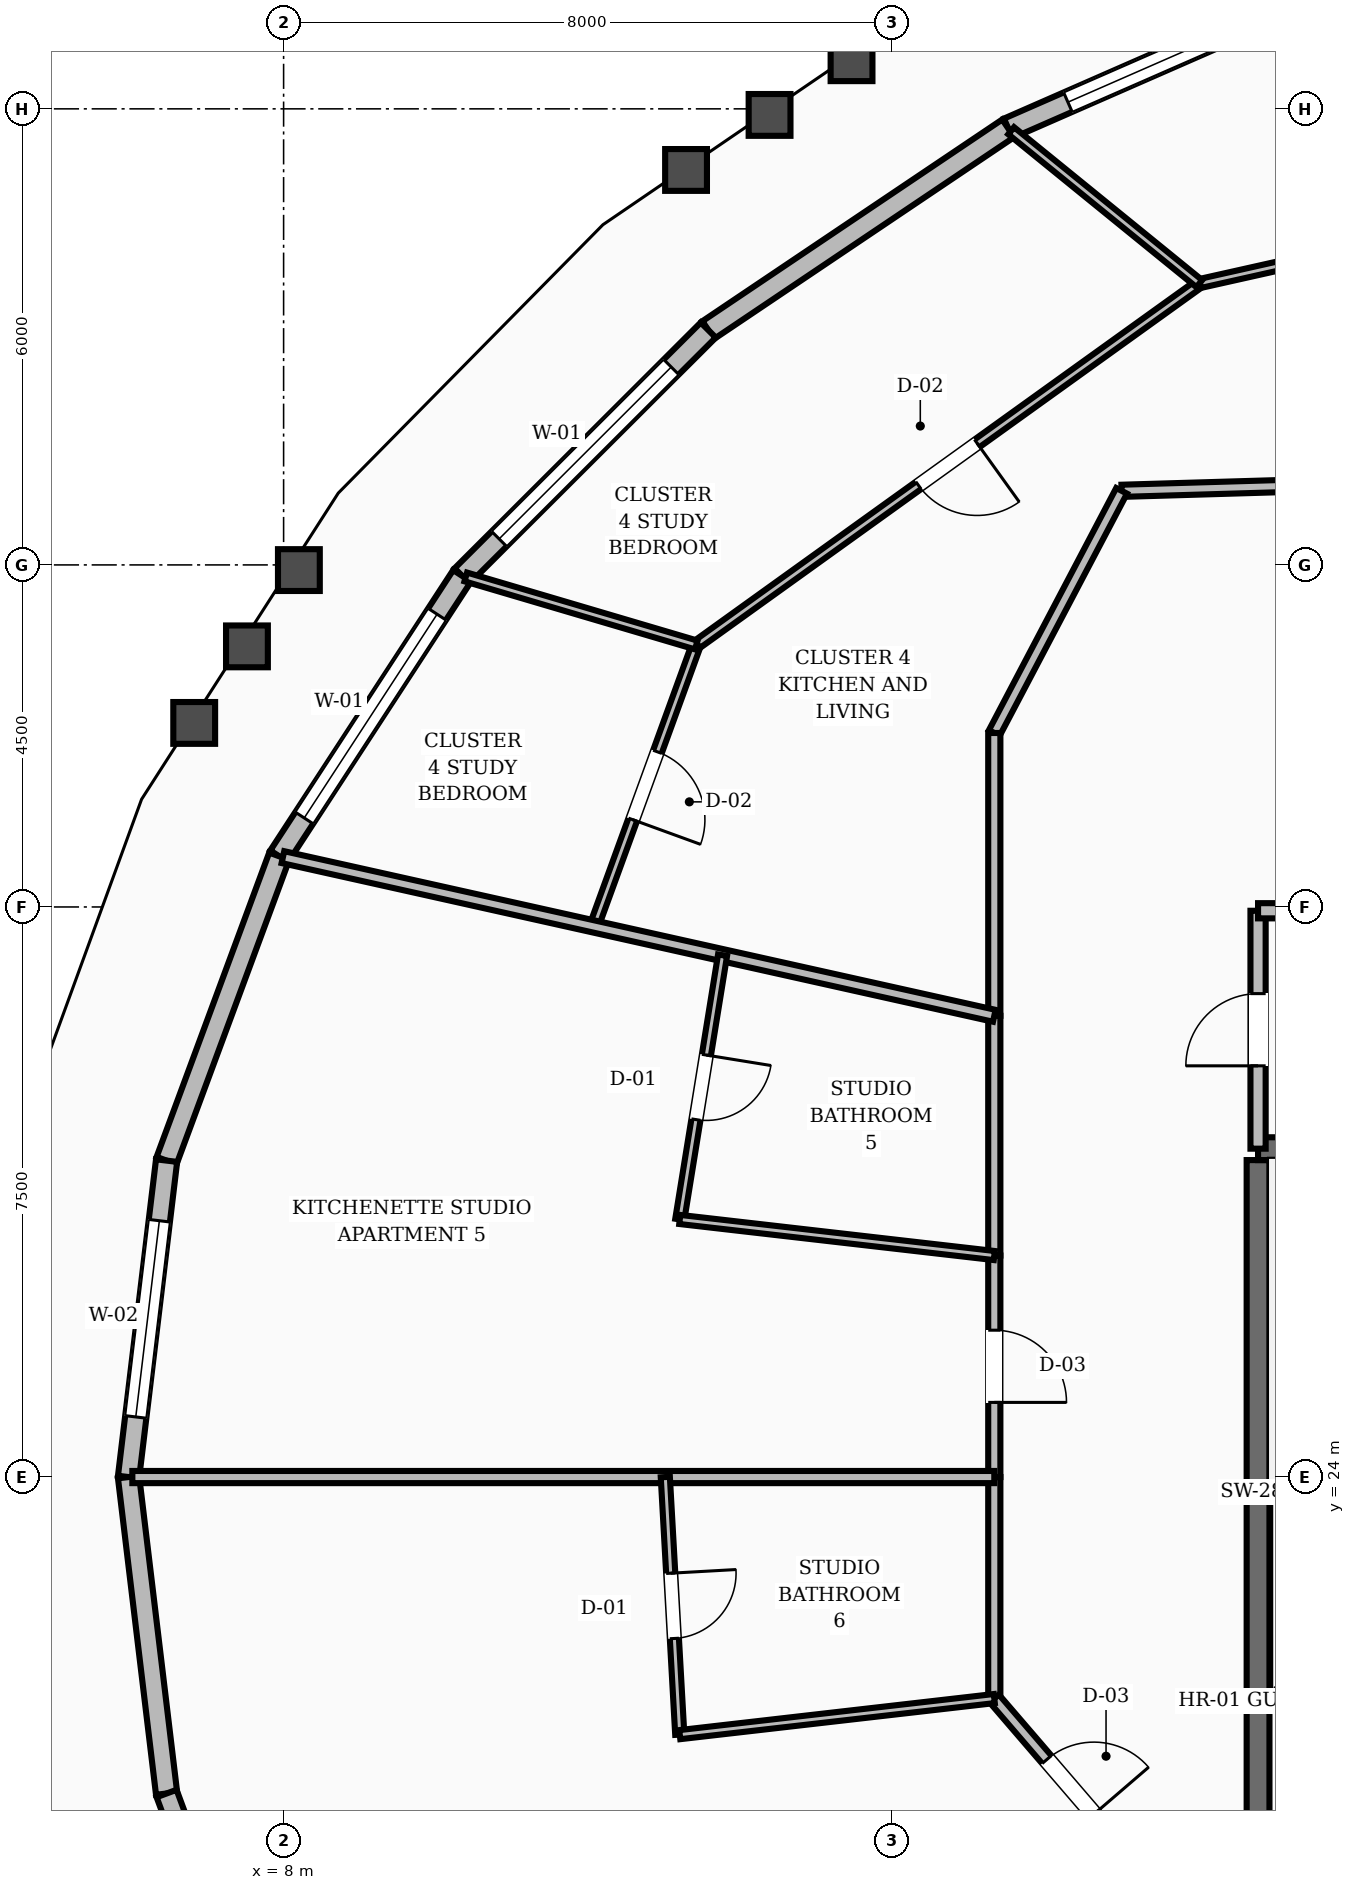
"""IFC4 building model, lengths in metres.
Left out: names, types, materials, properties, quantities, classifications, styles, units other than length and angle.
Written with IfcOpenShell. Run it as: python <this file> out.ifc"""

import sys

from ifc_helpers import new_model, si_unit, direction, frame, frame_2d, origin, place, context, subcontext, project, spatial, rectangle, extrude, element, fill, save


model = new_model("IFC4")
c1 = context("Model", 3, precision=1e-05, world=origin(), true_north=direction((0.0, 1.0)))
c2 = subcontext(c1, "Body", "Model", "MODEL_VIEW")
j1 = project(units=[si_unit("LENGTHUNIT", "METRE"), si_unit("PLANEANGLEUNIT", "RADIAN")], contexts=[c1])
p1 = place(None, origin())
s1 = spatial("IfcSite", under=j1, at=p1, CompositionType="ELEMENT")
p2 = place(p1, origin())
s2 = spatial("IfcBuilding", under=s1, at=p2, CompositionType="ELEMENT")
p3 = place(p2, frame((0.0, 0.0, 174.8)))
s3 = spatial("IfcBuildingStorey", under=s2, at=p3, CompositionType="ELEMENT", Elevation=174.8)
p4 = place(p3, frame((20.82, 19.43, 0.0), z_axis=(0.0, 0.0, 1.0), x_axis=(0.0, 1.0, 0.0)))
e1 = element("IfcWall", 1, at=p4, inside=s3, PredefinedType="SHEAR", context=c2, shape_type="SweptSolid", body=[
    extrude(rectangle(XDim=8.74, YDim=0.3, at=frame_2d((4.37, 0.0))), origin(), (0.0, 0.0, 1.0), 3.6),
])
p5 = place(p3, frame((20.82, 28.32, 0.0), z_axis=(0.0, 0.0, 1.0), x_axis=(1.0, 0.0, 0.0)))
e2 = element("IfcWall", 2, at=p5, inside=s3, PredefinedType="SHEAR", context=c2, shape_type="SweptSolid", body=[
    extrude(rectangle(XDim=3.6, YDim=0.3, at=frame_2d((1.8, 0.0))), origin(), (0.0, 0.0, 1.0), 3.6),
])
p6 = place(p3, frame((22.035, 43.716, 0.0), z_axis=(0.0, 0.0, 1.0), x_axis=(-0.915983961181, -0.401214883647, 0.0)))
e3 = element("IfcWall", 3, at=p6, inside=s3, PredefinedType="STANDARD", context=c2, shape_type="SweptSolid", body=[
    extrude(rectangle(XDim=4.915, YDim=0.28, at=frame_2d((2.458, 0.0))), origin(), (0.0, 0.0, 1.0), 2.82),
])
p7 = place(p6, frame((0.857, 0.0, 0.8)))
e4 = element("IfcOpeningElement", 4, at=p7, cuts=e3, PredefinedType="OPENING", context=c2, shape_type="SweptSolid", body=[
    extrude(rectangle(XDim=3.2, YDim=1.65, at=frame_2d((1.6, 0.825))), frame((0.0, 0.15, 0.0), z_axis=(0.0, -1.0, 0.0), x_axis=(1.0, 0.0, 0.0)), (0.0, 0.0, 1.0), 0.3),
])
p8 = place(p3, frame((17.533, 41.744, 0.0), z_axis=(0.0, 0.0, 1.0), x_axis=(-0.829776575502, -0.558095721851, 0.0)))
e5 = element("IfcWall", 5, at=p8, inside=s3, PredefinedType="STANDARD", context=c2, shape_type="SweptSolid", body=[
    extrude(rectangle(XDim=4.756, YDim=0.28, at=frame_2d((2.378, 0.0))), origin(), (0.0, 0.0, 1.0), 2.82),
])
p9 = place(p3, frame((13.587, 39.09, 0.0), z_axis=(0.0, 0.0, 1.0), x_axis=(-0.707640043992, -0.706573115919, 0.0)))
e6 = element("IfcWall", 6, at=p9, inside=s3, PredefinedType="STANDARD", context=c2, shape_type="SweptSolid", body=[
    extrude(rectangle(XDim=4.576, YDim=0.28, at=frame_2d((2.288, 0.0))), origin(), (0.0, 0.0, 1.0), 2.82),
])
p10 = place(p9, frame((0.688, 0.0, 0.8)))
e7 = element("IfcOpeningElement", 7, at=p10, cuts=e6, PredefinedType="OPENING", context=c2, shape_type="SweptSolid", body=[
    extrude(rectangle(XDim=3.2, YDim=1.65, at=frame_2d((1.6, 0.825))), frame((0.0, 0.15, 0.0), z_axis=(0.0, -1.0, 0.0), x_axis=(1.0, 0.0, 0.0)), (0.0, 0.0, 1.0), 0.3),
])
p11 = place(p3, frame((10.348, 35.856, 0.0), z_axis=(0.0, 0.0, 1.0), x_axis=(-0.54628130625, -0.837601775573, 0.0)))
e8 = element("IfcWall", 8, at=p11, inside=s3, PredefinedType="STANDARD", context=c2, shape_type="SweptSolid", body=[
    extrude(rectangle(XDim=4.405, YDim=0.28, at=frame_2d((2.202, 0.0))), origin(), (0.0, 0.0, 1.0), 2.82),
])
p12 = place(p11, frame((0.602, 0.0, 0.8)))
e9 = element("IfcOpeningElement", 9, at=p12, cuts=e8, PredefinedType="OPENING", context=c2, shape_type="SweptSolid", body=[
    extrude(rectangle(XDim=3.2, YDim=1.65, at=frame_2d((1.6, 0.825))), frame((0.0, 0.15, 0.0), z_axis=(0.0, -1.0, 0.0), x_axis=(1.0, 0.0, 0.0)), (0.0, 0.0, 1.0), 0.3),
])
p13 = place(p3, frame((7.942, 32.167, 0.0), z_axis=(0.0, 0.0, 1.0), x_axis=(-0.347096410893, -0.93782945227, 0.0)))
e10 = element("IfcWall", 10, at=p13, inside=s3, PredefinedType="STANDARD", context=c2, shape_type="SweptSolid", body=[
    extrude(rectangle(XDim=4.269, YDim=0.28, at=frame_2d((2.134, 0.0))), origin(), (0.0, 0.0, 1.0), 2.82),
])
p14 = place(p3, frame((6.46, 28.163, 0.0), z_axis=(0.0, 0.0, 1.0), x_axis=(-0.119361035634, -0.992850916892, 0.0)))
e11 = element("IfcWall", 11, at=p14, inside=s3, PredefinedType="STANDARD", context=c2, shape_type="SweptSolid", body=[
    extrude(rectangle(XDim=4.193, YDim=0.28, at=frame_2d((2.097, 0.0))), origin(), (0.0, 0.0, 1.0), 2.82),
])
p15 = place(p14, frame((0.797, 0.0, 0.8)))
e12 = element("IfcOpeningElement", 12, at=p15, cuts=e11, PredefinedType="OPENING", context=c2, shape_type="SweptSolid", body=[
    extrude(rectangle(XDim=2.6, YDim=1.65, at=frame_2d((1.3, 0.825))), frame((0.0, 0.15, 0.0), z_axis=(0.0, -1.0, 0.0), x_axis=(1.0, 0.0, 0.0)), (0.0, 0.0, 1.0), 0.3),
])
p16 = place(p3, frame((5.96, 24.0, 0.0), z_axis=(0.0, 0.0, 1.0), x_axis=(0.119361035634, -0.992850916892, 0.0)))
e13 = element("IfcWall", 13, at=p16, inside=s3, PredefinedType="STANDARD", context=c2, shape_type="SweptSolid", body=[
    extrude(rectangle(XDim=4.193, YDim=0.28, at=frame_2d((2.097, 0.0))), origin(), (0.0, 0.0, 1.0), 2.82),
])
p17 = place(p3, frame((6.46, 19.837, 0.0), z_axis=(0.0, 0.0, 1.0), x_axis=(0.347096410893, -0.93782945227, 0.0)))
e14 = element("IfcWall", 14, at=p17, inside=s3, PredefinedType="STANDARD", context=c2, shape_type="SweptSolid", body=[
    extrude(rectangle(XDim=4.269, YDim=0.28, at=frame_2d((2.134, 0.0))), origin(), (0.0, 0.0, 1.0), 2.82),
])
p18 = place(p3, frame((20.82, 28.32, 0.0), z_axis=(0.0, 0.0, 1.0), x_axis=(0.0, 1.0, 0.0)))
e15 = element("IfcWall", 15, at=p18, inside=s3, PredefinedType="SOLIDWALL", context=c2, shape_type="SweptSolid", body=[
    extrude(rectangle(XDim=3.13, YDim=0.2, at=frame_2d((1.565, 0.0))), origin(), (0.0, 0.0, 1.0), 2.8),
])
p19 = place(p18, frame((1.09, 0.0, 0.0)))
e16 = element("IfcOpeningElement", 16, at=p19, cuts=e15, PredefinedType="OPENING", context=c2, shape_type="SweptSolid", body=[
    extrude(rectangle(XDim=0.95, YDim=2.1, at=frame_2d((0.475, 1.05))), frame((0.0, 0.11, 0.0), z_axis=(0.0, -1.0, 0.0), x_axis=(1.0, 0.0, 0.0)), (0.0, 0.0, 1.0), 0.22),
])
p20 = place(p3, frame((20.82, 31.45, 0.0), z_axis=(0.0, 0.0, 1.0), x_axis=(1.0, 0.0, 0.0)))
e17 = element("IfcWall", 17, at=p20, inside=s3, PredefinedType="SOLIDWALL", context=c2, shape_type="SweptSolid", body=[
    extrude(rectangle(XDim=3.98, YDim=0.2, at=frame_2d((1.99, 0.0))), origin(), (0.0, 0.0, 1.0), 2.8),
])
p21 = place(p3, frame((23.247, 37.1, 0.0), z_axis=(0.0, 0.0, 1.0), x_axis=(-0.999561990195, -0.029594387265, 0.0)))
e18 = element("IfcWall", 18, at=p21, inside=s3, PredefinedType="SOLIDWALL", context=c2, shape_type="SweptSolid", body=[
    extrude(rectangle(XDim=4.224, YDim=0.16, at=frame_2d((2.112, 0.0))), origin(), (0.0, 0.0, 1.0), 2.8),
])
p22 = place(p3, frame((19.025, 36.975, 0.0), z_axis=(0.0, 0.0, 1.0), x_axis=(-0.46527115782, -0.885168204185, 0.0)))
e19 = element("IfcWall", 19, at=p22, inside=s3, PredefinedType="SOLIDWALL", context=c2, shape_type="SweptSolid", body=[
    extrude(rectangle(XDim=3.6, YDim=0.16, at=frame_2d((1.8, 0.0))), origin(), (0.0, 0.0, 1.0), 2.8),
])
p23 = place(p3, frame((17.35, 33.789, 0.0), z_axis=(0.0, 0.0, 1.0), x_axis=(0.0, -1.0, 0.0)))
e20 = element("IfcWall", 20, at=p23, inside=s3, PredefinedType="SOLIDWALL", context=c2, shape_type="SweptSolid", body=[
    extrude(rectangle(XDim=3.721, YDim=0.16, at=frame_2d((1.86, 0.0))), origin(), (0.0, 0.0, 1.0), 2.8),
])
p24 = place(p3, frame((17.35, 30.068, 0.0), z_axis=(0.0, 0.0, 1.0), x_axis=(0.0, -1.0, 0.0)))
e21 = element("IfcWall", 21, at=p24, inside=s3, PredefinedType="SOLIDWALL", context=c2, shape_type="SweptSolid", body=[
    extrude(rectangle(XDim=3.154, YDim=0.16, at=frame_2d((1.577, 0.0))), origin(), (0.0, 0.0, 1.0), 2.8),
])
p25 = place(p3, frame((17.35, 26.914, 0.0), z_axis=(0.0, 0.0, 1.0), x_axis=(0.0, -1.0, 0.0)))
e22 = element("IfcWall", 22, at=p25, inside=s3, PredefinedType="SOLIDWALL", context=c2, shape_type="SweptSolid", body=[
    extrude(rectangle(XDim=2.914, YDim=0.16, at=frame_2d((1.457, 0.0))), origin(), (0.0, 0.0, 1.0), 2.8),
])
p26 = place(p25, frame((0.982, 0.0, 0.0)))
e23 = element("IfcOpeningElement", 23, at=p26, cuts=e22, PredefinedType="OPENING", context=c2, shape_type="SweptSolid", body=[
    extrude(rectangle(XDim=0.95, YDim=2.1, at=frame_2d((0.475, 1.05))), frame((0.0, 0.09, 0.0), z_axis=(0.0, -1.0, 0.0), x_axis=(1.0, 0.0, 0.0)), (0.0, 0.0, 1.0), 0.18),
])
p27 = place(p3, frame((17.35, 24.0, 0.0), z_axis=(0.0, 0.0, 1.0), x_axis=(0.0, -1.0, 0.0)))
e24 = element("IfcWall", 24, at=p27, inside=s3, PredefinedType="SOLIDWALL", context=c2, shape_type="SweptSolid", body=[
    extrude(rectangle(XDim=2.914, YDim=0.16, at=frame_2d((1.457, 0.0))), origin(), (0.0, 0.0, 1.0), 2.8),
])
p28 = place(p3, frame((17.35, 21.086, 0.0), z_axis=(0.0, 0.0, 1.0), x_axis=(0.652022797448, -0.758199361388, 0.0)))
e25 = element("IfcWall", 25, at=p28, inside=s3, PredefinedType="SOLIDWALL", context=c2, shape_type="SweptSolid", body=[
    extrude(rectangle(XDim=3.067, YDim=0.16, at=frame_2d((1.534, 0.0))), origin(), (0.0, 0.0, 1.0), 2.8),
])
p29 = place(p28, frame((1.059, 0.0, 0.0)))
e26 = element("IfcOpeningElement", 26, at=p29, cuts=e25, PredefinedType="OPENING", context=c2, shape_type="SweptSolid", body=[
    extrude(rectangle(XDim=0.95, YDim=2.1, at=frame_2d((0.475, 1.05))), frame((0.0, 0.09, 0.0), z_axis=(0.0, -1.0, 0.0), x_axis=(1.0, 0.0, 0.0)), (0.0, 0.0, 1.0), 0.18),
])
p30 = place(p3, frame((28.009, 41.485, 0.0), z_axis=(0.0, 0.0, 1.0), x_axis=(-0.975790457845, -0.218707527028, 0.0)))
e27 = element("IfcWall", 27, at=p30, inside=s3, PredefinedType="PARTITIONING", context=c2, shape_type="SweptSolid", body=[
    extrude(rectangle(XDim=8.159, YDim=0.12, at=frame_2d((4.08, 0.0))), origin(), (0.0, 0.0, 1.0), 2.8),
])
p31 = place(p30, frame((4.997, 0.0, 0.0)))
e28 = element("IfcOpeningElement", 28, at=p31, cuts=e27, PredefinedType="OPENING", context=c2, shape_type="SweptSolid", body=[
    extrude(rectangle(XDim=0.95, YDim=2.1, at=frame_2d((0.475, 1.05))), frame((0.0, 0.07, 0.0), z_axis=(0.0, -1.0, 0.0), x_axis=(1.0, 0.0, 0.0)), (0.0, 0.0, 1.0), 0.14),
])
p32 = place(p3, frame((20.047, 39.7, 0.0), z_axis=(0.0, 0.0, 1.0), x_axis=(-0.812159557972, -0.583435388364, 0.0)))
e29 = element("IfcWall", 29, at=p32, inside=s3, PredefinedType="PARTITIONING", context=c2, shape_type="SweptSolid", body=[
    extrude(rectangle(XDim=8.148, YDim=0.12, at=frame_2d((4.074, 0.0))), origin(), (0.0, 0.0, 1.0), 2.8),
])
p33 = place(p32, frame((3.599, 0.0, 0.0)))
e30 = element("IfcOpeningElement", 30, at=p33, cuts=e29, PredefinedType="OPENING", context=c2, shape_type="SweptSolid", body=[
    extrude(rectangle(XDim=0.95, YDim=2.1, at=frame_2d((0.475, 1.05))), frame((0.0, 0.07, 0.0), z_axis=(0.0, -1.0, 0.0), x_axis=(1.0, 0.0, 0.0)), (0.0, 0.0, 1.0), 0.14),
])
p34 = place(p3, frame((20.047, 39.7, 0.0), z_axis=(0.0, 0.0, 1.0), x_axis=(-0.776036734146, 0.630687709771, 0.0)))
e31 = element("IfcWall", 31, at=p34, inside=s3, PredefinedType="PARTITIONING", context=c2, shape_type="SweptSolid", body=[
    extrude(rectangle(XDim=3.19, YDim=0.12, at=frame_2d((1.595, 0.0))), origin(), (0.0, 0.0, 1.0), 2.8),
])
p35 = place(p3, frame((13.429, 34.946, 0.0), z_axis=(0.0, 0.0, 1.0), x_axis=(-0.341981820704, -0.939706568195, 0.0)))
e32 = element("IfcWall", 32, at=p35, inside=s3, PredefinedType="PARTITIONING", context=c2, shape_type="SweptSolid", body=[
    extrude(rectangle(XDim=3.941, YDim=0.12, at=frame_2d((1.97, 0.0))), origin(), (0.0, 0.0, 1.0), 2.8),
])
p36 = place(p35, frame((1.495, 0.0, 0.0)))
e33 = element("IfcOpeningElement", 33, at=p36, cuts=e32, PredefinedType="OPENING", context=c2, shape_type="SweptSolid", body=[
    extrude(rectangle(XDim=0.95, YDim=2.1, at=frame_2d((0.475, 1.05))), frame((0.0, 0.07, 0.0), z_axis=(0.0, -1.0, 0.0), x_axis=(1.0, 0.0, 0.0)), (0.0, 0.0, 1.0), 0.14),
])
p37 = place(p3, frame((13.429, 34.946, 0.0), z_axis=(0.0, 0.0, 1.0), x_axis=(-0.959062516334, 0.283194438087, 0.0)))
e34 = element("IfcWall", 34, at=p37, inside=s3, PredefinedType="PARTITIONING", context=c2, shape_type="SweptSolid", body=[
    extrude(rectangle(XDim=3.162, YDim=0.12, at=frame_2d((1.581, 0.0))), origin(), (0.0, 0.0, 1.0), 2.8),
])
p38 = place(p3, frame((17.35, 30.068, 0.0), z_axis=(0.0, 0.0, 1.0), x_axis=(-0.976019030179, 0.217685214765, 0.0)))
e35 = element("IfcWall", 35, at=p38, inside=s3, PredefinedType="SOLIDWALL", context=c2, shape_type="SweptSolid", body=[
    extrude(rectangle(XDim=9.589, YDim=0.16, at=frame_2d((4.794, 0.0))), origin(), (0.0, 0.0, 1.0), 2.8),
])
p39 = place(p3, frame((13.775, 30.865, 0.0), z_axis=(0.0, 0.0, 1.0), x_axis=(-0.159855739545, -0.987140386437, 0.0)))
e36 = element("IfcWall", 36, at=p39, inside=s3, PredefinedType="PARTITIONING", context=c2, shape_type="SweptSolid", body=[
    extrude(rectangle(XDim=3.522, YDim=0.12, at=frame_2d((1.761, 0.0))), origin(), (0.0, 0.0, 1.0), 2.8),
])
p40 = place(p39, frame((1.331, 0.0, 0.0)))
e37 = element("IfcOpeningElement", 37, at=p40, cuts=e36, PredefinedType="OPENING", context=c2, shape_type="SweptSolid", body=[
    extrude(rectangle(XDim=0.86, YDim=2.1, at=frame_2d((0.43, 1.05))), frame((0.0, 0.07, 0.0), z_axis=(0.0, -1.0, 0.0), x_axis=(1.0, 0.0, 0.0)), (0.0, 0.0, 1.0), 0.14),
])
p41 = place(p3, frame((17.35, 26.914, 0.0), z_axis=(0.0, 0.0, 1.0), x_axis=(-0.993480615662, 0.114001167992, 0.0)))
e38 = element("IfcWall", 38, at=p41, inside=s3, PredefinedType="PARTITIONING", context=c2, shape_type="SweptSolid", body=[
    extrude(rectangle(XDim=4.165, YDim=0.12, at=frame_2d((2.083, 0.0))), origin(), (0.0, 0.0, 1.0), 2.8),
])
p42 = place(p3, frame((17.35, 24.0, 0.0), z_axis=(0.0, 0.0, 1.0), x_axis=(-1.0, 0.0, 0.0)))
e39 = element("IfcWall", 39, at=p42, inside=s3, PredefinedType="SOLIDWALL", context=c2, shape_type="SweptSolid", body=[
    extrude(rectangle(XDim=11.34, YDim=0.16, at=frame_2d((5.67, 0.0))), origin(), (0.0, 0.0, 1.0), 2.8),
])
p43 = place(p3, frame((13.022, 24.0, 0.0), z_axis=(0.0, 0.0, 1.0), x_axis=(0.056031711183, -0.998428989634, 0.0)))
e40 = element("IfcWall", 40, at=p43, inside=s3, PredefinedType="PARTITIONING", context=c2, shape_type="SweptSolid", body=[
    extrude(rectangle(XDim=3.394, YDim=0.12, at=frame_2d((1.697, 0.0))), origin(), (0.0, 0.0, 1.0), 2.8),
])
p44 = place(p43, frame((1.267, 0.0, 0.0)))
e41 = element("IfcOpeningElement", 41, at=p44, cuts=e40, PredefinedType="OPENING", context=c2, shape_type="SweptSolid", body=[
    extrude(rectangle(XDim=0.86, YDim=2.1, at=frame_2d((0.43, 1.05))), frame((0.0, 0.07, 0.0), z_axis=(0.0, -1.0, 0.0), x_axis=(1.0, 0.0, 0.0)), (0.0, 0.0, 1.0), 0.14),
])
p45 = place(p3, frame((17.35, 21.086, 0.0), z_axis=(0.0, 0.0, 1.0), x_axis=(-0.993480615662, -0.114001167992, 0.0)))
e42 = element("IfcWall", 42, at=p45, inside=s3, PredefinedType="PARTITIONING", context=c2, shape_type="SweptSolid", body=[
    extrude(rectangle(XDim=4.165, YDim=0.12, at=frame_2d((2.083, 0.0))), origin(), (0.0, 0.0, 1.0), 2.8),
])
p46 = place(p7, origin())
e43 = element("IfcWindow", 43, at=p46, inside=s3, PartitioningType="SINGLE_PANEL", PredefinedType="WINDOW", context=c2, shape_type="SweptSolid", body=[
    extrude(rectangle(XDim=3.2, YDim=1.65, at=frame_2d((1.6, 0.825))), frame((0.0, 0.03, 0.0), z_axis=(0.0, -1.0, 0.0), x_axis=(1.0, 0.0, 0.0)), (0.0, 0.0, 1.0), 0.06),
])
fill(e4, e43)
p47 = place(p10, origin())
e44 = element("IfcWindow", 44, at=p47, inside=s3, PartitioningType="SINGLE_PANEL", PredefinedType="WINDOW", context=c2, shape_type="SweptSolid", body=[
    extrude(rectangle(XDim=3.2, YDim=1.65, at=frame_2d((1.6, 0.825))), frame((0.0, 0.03, 0.0), z_axis=(0.0, -1.0, 0.0), x_axis=(1.0, 0.0, 0.0)), (0.0, 0.0, 1.0), 0.06),
])
fill(e7, e44)
p48 = place(p12, origin())
e45 = element("IfcWindow", 45, at=p48, inside=s3, PartitioningType="SINGLE_PANEL", PredefinedType="WINDOW", context=c2, shape_type="SweptSolid", body=[
    extrude(rectangle(XDim=3.2, YDim=1.65, at=frame_2d((1.6, 0.825))), frame((0.0, 0.03, 0.0), z_axis=(0.0, -1.0, 0.0), x_axis=(1.0, 0.0, 0.0)), (0.0, 0.0, 1.0), 0.06),
])
fill(e9, e45)
p49 = place(p15, origin())
e46 = element("IfcWindow", 46, at=p49, inside=s3, PartitioningType="SINGLE_PANEL", PredefinedType="WINDOW", context=c2, shape_type="SweptSolid", body=[
    extrude(rectangle(XDim=2.6, YDim=1.65, at=frame_2d((1.3, 0.825))), frame((0.0, 0.03, 0.0), z_axis=(0.0, -1.0, 0.0), x_axis=(1.0, 0.0, 0.0)), (0.0, 0.0, 1.0), 0.06),
])
fill(e12, e46)
p50 = place(p19, origin())
e47 = element("IfcDoor", 47, at=p50, inside=s3, OperationType="SINGLE_SWING_LEFT", PredefinedType="DOOR", context=c2, shape_type="SweptSolid", body=[
    extrude(rectangle(XDim=0.95, YDim=2.1, at=frame_2d((0.475, 1.05))), frame((0.0, 0.025, 0.0), z_axis=(0.0, -1.0, 0.0), x_axis=(1.0, 0.0, 0.0)), (0.0, 0.0, 1.0), 0.05),
])
fill(e16, e47)
p51 = place(p33, origin())
e48 = element("IfcDoor", 48, at=p51, inside=s3, OperationType="SINGLE_SWING_LEFT", PredefinedType="DOOR", context=c2, shape_type="SweptSolid", body=[
    extrude(rectangle(XDim=0.95, YDim=2.1, at=frame_2d((0.475, 1.05))), frame((0.0, 0.025, 0.0), z_axis=(0.0, -1.0, 0.0), x_axis=(1.0, 0.0, 0.0)), (0.0, 0.0, 1.0), 0.05),
])
fill(e30, e48)
p52 = place(p36, origin())
e49 = element("IfcDoor", 49, at=p52, inside=s3, OperationType="SINGLE_SWING_RIGHT", PredefinedType="DOOR", context=c2, shape_type="SweptSolid", body=[
    extrude(rectangle(XDim=0.95, YDim=2.1, at=frame_2d((0.475, 1.05))), frame((0.0, 0.025, 0.0), z_axis=(0.0, -1.0, 0.0), x_axis=(1.0, 0.0, 0.0)), (0.0, 0.0, 1.0), 0.05),
])
fill(e33, e49)
p53 = place(p40, origin())
e50 = element("IfcDoor", 50, at=p53, inside=s3, OperationType="SINGLE_SWING_LEFT", PredefinedType="DOOR", context=c2, shape_type="SweptSolid", body=[
    extrude(rectangle(XDim=0.86, YDim=2.1, at=frame_2d((0.43, 1.05))), frame((0.0, 0.025, 0.0), z_axis=(0.0, -1.0, 0.0), x_axis=(1.0, 0.0, 0.0)), (0.0, 0.0, 1.0), 0.05),
])
fill(e37, e50)
p54 = place(p26, origin())
e51 = element("IfcDoor", 51, at=p54, inside=s3, OperationType="SINGLE_SWING_RIGHT", PredefinedType="DOOR", context=c2, shape_type="SweptSolid", body=[
    extrude(rectangle(XDim=0.95, YDim=2.1, at=frame_2d((0.475, 1.05))), frame((0.0, 0.025, 0.0), z_axis=(0.0, -1.0, 0.0), x_axis=(1.0, 0.0, 0.0)), (0.0, 0.0, 1.0), 0.05),
])
fill(e23, e51)
p55 = place(p44, origin())
e52 = element("IfcDoor", 52, at=p55, inside=s3, OperationType="SINGLE_SWING_LEFT", PredefinedType="DOOR", context=c2, shape_type="SweptSolid", body=[
    extrude(rectangle(XDim=0.86, YDim=2.1, at=frame_2d((0.43, 1.05))), frame((0.0, 0.025, 0.0), z_axis=(0.0, -1.0, 0.0), x_axis=(1.0, 0.0, 0.0)), (0.0, 0.0, 1.0), 0.05),
])
fill(e41, e52)
p56 = place(p29, origin())
e53 = element("IfcDoor", 53, at=p56, inside=s3, OperationType="SINGLE_SWING_RIGHT", PredefinedType="DOOR", context=c2, shape_type="SweptSolid", body=[
    extrude(rectangle(XDim=0.95, YDim=2.1, at=frame_2d((0.475, 1.05))), frame((0.0, 0.025, 0.0), z_axis=(0.0, -1.0, 0.0), x_axis=(1.0, 0.0, 0.0)), (0.0, 0.0, 1.0), 0.05),
])
fill(e26, e53)
save(model, sys.argv[1])
